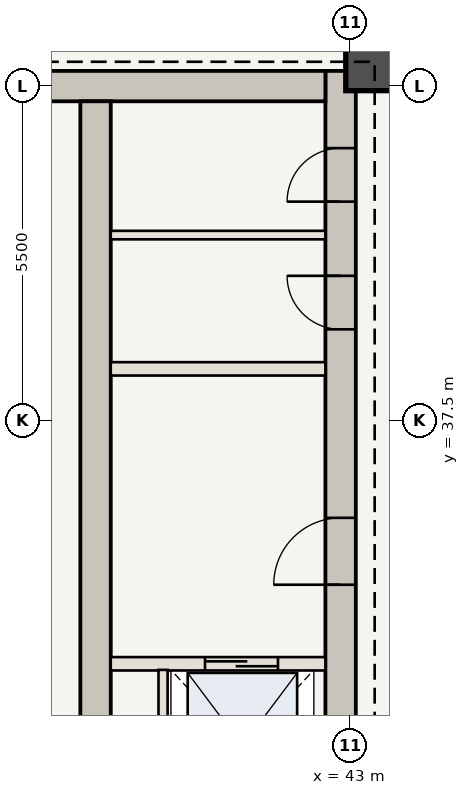
"""IFC4 building model, lengths in metres.
Left out: names, types, materials, properties, quantities, classifications, styles, units other than length and angle.
Written with IfcOpenShell. Run it as: python <this file> out.ifc"""

import sys

from ifc_helpers import new_model, si_unit, direction, frame, frame_2d, origin, origin_2d, place, context, subcontext, project, spatial, rectangle, extrude, element, fill, save


model = new_model("IFC4")
c1 = context("Model", 3, precision=1e-05, world=origin(), true_north=direction((0.0, 1.0)))
c2 = subcontext(c1, "Body", "Model", "MODEL_VIEW")
j1 = project(units=[si_unit("LENGTHUNIT", "METRE"), si_unit("PLANEANGLEUNIT", "RADIAN")], contexts=[c1])
p1 = place(None, origin())
s1 = spatial("IfcSite", under=j1, at=p1, CompositionType="ELEMENT")
p2 = place(p1, origin())
s2 = spatial("IfcBuilding", under=s1, at=p2, CompositionType="ELEMENT")
p3 = place(p2, frame((0.0, 0.0, 186.9)))
s3 = spatial("IfcBuildingStorey", under=s2, at=p3, CompositionType="ELEMENT", Elevation=186.9)
p4 = place(p3, frame((42.84, 30.6, 0.0), z_axis=(0.0, 0.0, 1.0), x_axis=(0.0, 1.0, 0.0)))
e1 = element("IfcWall", 1, at=p4, inside=s3, PredefinedType="SHEAR", context=c2, shape_type="SweptSolid", body=[
    extrude(rectangle(XDim=12.65, YDim=0.5, at=frame_2d((6.325, 0.0))), origin(), (0.0, 0.0, 1.0), 3.85),
])
p5 = place(p4, frame((4.2, 0.0, 0.0)))
e2 = element("IfcOpeningElement", 2, at=p5, cuts=e1, PredefinedType="OPENING", context=c2, shape_type="SweptSolid", body=[
    extrude(rectangle(XDim=1.1, YDim=2.15, at=frame_2d((0.55, 1.075))), frame((0.0, 0.26, 0.0), z_axis=(0.0, -1.0, 0.0), x_axis=(1.0, 0.0, 0.0)), (0.0, 0.0, 1.0), 0.52),
])
p6 = place(p4, frame((8.4, 0.0, 0.0)))
e3 = element("IfcOpeningElement", 3, at=p6, cuts=e1, PredefinedType="OPENING", context=c2, shape_type="SweptSolid", body=[
    extrude(rectangle(XDim=0.88, YDim=2.1, at=frame_2d((0.44, 1.05))), frame((0.0, 0.26, 0.0), z_axis=(0.0, -1.0, 0.0), x_axis=(1.0, 0.0, 0.0)), (0.0, 0.0, 1.0), 0.52),
])
p7 = place(p4, frame((10.5, 0.0, 0.0)))
e4 = element("IfcOpeningElement", 4, at=p7, cuts=e1, PredefinedType="OPENING", context=c2, shape_type="SweptSolid", body=[
    extrude(rectangle(XDim=0.88, YDim=2.1, at=frame_2d((0.44, 1.05))), frame((0.0, 0.26, 0.0), z_axis=(0.0, -1.0, 0.0), x_axis=(1.0, 0.0, 0.0)), (0.0, 0.0, 1.0), 0.52),
])
p8 = place(p3, frame((37.75, 43.0, 0.0), z_axis=(0.0, 0.0, 1.0), x_axis=(1.0, 0.0, 0.0)))
e5 = element("IfcWall", 5, at=p8, inside=s3, PredefinedType="SHEAR", context=c2, shape_type="SweptSolid", body=[
    extrude(rectangle(XDim=4.84, YDim=0.5, at=frame_2d((2.42, 0.0))), origin(), (0.0, 0.0, 1.0), 3.85),
])
p9 = place(p3, frame((38.81, 30.6, 0.0), z_axis=(0.0, 0.0, 1.0), x_axis=(0.0, 1.0, 0.0)))
e6 = element("IfcWall", 6, at=p9, inside=s3, PredefinedType="SHEAR", context=c2, shape_type="SweptSolid", body=[
    extrude(rectangle(XDim=12.15, YDim=0.5, at=frame_2d((6.075, 0.0))), origin(), (0.0, 0.0, 1.0), 3.85),
])
p10 = place(p3, frame((43.35, 43.35, 0.0), z_axis=(0.0, 0.0, 1.0), x_axis=(1.0, 0.0, 0.0)))
e7 = element("IfcColumn", 7, at=p10, inside=s3, PredefinedType="COLUMN", context=c2, shape_type="SweptSolid", body=[
    extrude(rectangle(XDim=0.85, YDim=0.85, at=origin_2d()), origin(), (0.0, 0.0, 1.0), 3.85),
])
p11 = place(p3, frame((39.06, 33.5, 0.0), z_axis=(0.0, 0.0, 1.0), x_axis=(1.0, 0.0, 0.0)))
e8 = element("IfcWall", 8, at=p11, inside=s3, PredefinedType="STANDARD", context=c2, shape_type="SweptSolid", body=[
    extrude(rectangle(XDim=3.53, YDim=0.22, at=frame_2d((1.765, 0.0))), origin(), (0.0, 0.0, 1.0), 3.43),
])
p12 = place(p11, frame((1.55, 0.0, 0.0)))
e9 = element("IfcOpeningElement", 9, at=p12, cuts=e8, PredefinedType="OPENING", context=c2, shape_type="SweptSolid", body=[
    extrude(rectangle(XDim=1.2, YDim=2.2, at=frame_2d((0.6, 1.1))), frame((0.0, 0.12, 0.0), z_axis=(0.0, -1.0, 0.0), x_axis=(1.0, 0.0, 0.0)), (0.0, 0.0, 1.0), 0.24),
])
p13 = place(p3, frame((39.92, 30.75, 0.0), z_axis=(0.0, 0.0, 1.0), x_axis=(0.0, 1.0, 0.0)))
e10 = element("IfcWall", 10, at=p13, inside=s3, PredefinedType="STANDARD", context=c2, shape_type="SweptSolid", body=[
    extrude(rectangle(XDim=2.65, YDim=0.15, at=frame_2d((1.325, 0.0))), origin(), (0.0, 0.0, 1.0), 3.43),
])
p14 = place(p3, frame((39.06, 38.35, 0.0), z_axis=(0.0, 0.0, 1.0), x_axis=(1.0, 0.0, 0.0)))
e11 = element("IfcWall", 11, at=p14, inside=s3, PredefinedType="STANDARD", context=c2, shape_type="SweptSolid", body=[
    extrude(rectangle(XDim=3.53, YDim=0.22, at=frame_2d((1.765, 0.0))), origin(), (0.0, 0.0, 1.0), 3.43),
])
p15 = place(p3, frame((39.06, 40.55, 0.0), z_axis=(0.0, 0.0, 1.0), x_axis=(1.0, 0.0, 0.0)))
e12 = element("IfcWall", 12, at=p15, inside=s3, PredefinedType="STANDARD", context=c2, shape_type="SweptSolid", body=[
    extrude(rectangle(XDim=3.53, YDim=0.14, at=frame_2d((1.765, 0.0))), origin(), (0.0, 0.0, 1.0), 3.43),
])
p16 = place(p5, origin())
e13 = element("IfcDoor", 13, at=p16, inside=s3, OperationType="SINGLE_SWING_LEFT", PredefinedType="DOOR", context=c2, shape_type="SweptSolid", body=[
    extrude(rectangle(XDim=1.1, YDim=2.15, at=frame_2d((0.55, 1.075))), frame((0.0, 0.025, 0.0), z_axis=(0.0, -1.0, 0.0), x_axis=(1.0, 0.0, 0.0)), (0.0, 0.0, 1.0), 0.05),
])
fill(e2, e13)
p17 = place(p6, origin())
e14 = element("IfcDoor", 14, at=p17, inside=s3, OperationType="SINGLE_SWING_RIGHT", PredefinedType="DOOR", context=c2, shape_type="SweptSolid", body=[
    extrude(rectangle(XDim=0.88, YDim=2.1, at=frame_2d((0.44, 1.05))), frame((0.0, 0.025, 0.0), z_axis=(0.0, -1.0, 0.0), x_axis=(1.0, 0.0, 0.0)), (0.0, 0.0, 1.0), 0.05),
])
fill(e3, e14)
p18 = place(p7, origin())
e15 = element("IfcDoor", 15, at=p18, inside=s3, OperationType="SINGLE_SWING_LEFT", PredefinedType="DOOR", context=c2, shape_type="SweptSolid", body=[
    extrude(rectangle(XDim=0.88, YDim=2.1, at=frame_2d((0.44, 1.05))), frame((0.0, 0.025, 0.0), z_axis=(0.0, -1.0, 0.0), x_axis=(1.0, 0.0, 0.0)), (0.0, 0.0, 1.0), 0.05),
])
fill(e4, e15)
p19 = place(p12, origin())
e16 = element("IfcDoor", 16, at=p19, inside=s3, OperationType="DOUBLE_DOOR_SLIDING", PredefinedType="DOOR", context=c2, shape_type="SweptSolid", body=[
    extrude(rectangle(XDim=1.2, YDim=2.2, at=frame_2d((0.6, 1.1))), frame((0.0, 0.025, 0.0), z_axis=(0.0, -1.0, 0.0), x_axis=(1.0, 0.0, 0.0)), (0.0, 0.0, 1.0), 0.05),
])
fill(e9, e16)
save(model, sys.argv[1])
